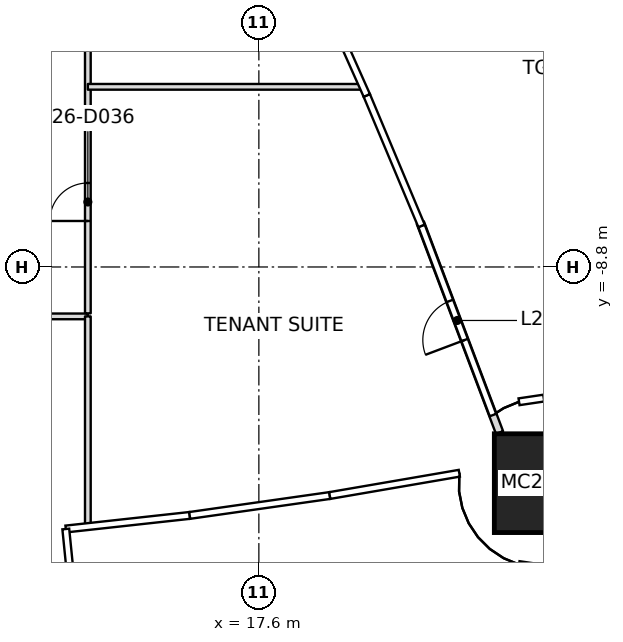
"""IFC4 building model, lengths in metres.
Left out: names, types, materials, properties, quantities, classifications, styles, units other than length and angle.
Written with IfcOpenShell. Run it as: python <this file> out.ifc"""

import sys

from ifc_helpers import new_model, si_unit, direction, frame, frame_2d, origin, origin_2d, place, context, subcontext, project, spatial, rectangle, extrude, clip, halfspace, element, fill, save


model = new_model("IFC4")
c1 = context("Model", 3, precision=1e-05, world=origin(), true_north=direction((0.0, 1.0)))
c2 = subcontext(c1, "Body", "Model", "MODEL_VIEW")
j1 = project(units=[si_unit("LENGTHUNIT", "METRE"), si_unit("PLANEANGLEUNIT", "RADIAN")], contexts=[c1])
p1 = place(None, origin())
s1 = spatial("IfcSite", under=j1, at=p1, CompositionType="ELEMENT")
p2 = place(p1, origin())
s2 = spatial("IfcBuilding", under=s1, at=p2, CompositionType="ELEMENT")
p3 = place(p2, frame((0.0, 0.0, 125.8)))
s3 = spatial("IfcBuildingStorey", under=s2, at=p3, CompositionType="ELEMENT", Elevation=125.8)
p4 = place(p3, frame((25.096, -14.489, 0.0), z_axis=(-0.028122372328, 0.016226791842, 0.999472772716), x_axis=(0.999604487872, 0.00045651644, 0.02811866672)))
e1 = element("IfcColumn", 1, at=p4, inside=s3, PredefinedType="COLUMN", context=c2, shape_type="SweptSolid", body=[
    clip(extrude(rectangle(XDim=2.6, YDim=2.6, at=origin_2d()), origin(), (0.0, 0.0, 1.0), 4.002), halfspace(frame((0.0, 0.0, 0.013)), True)),
])
p5 = place(p3, frame((23.933, -13.156, 0.0), z_axis=(0.0, 0.0, 1.0), x_axis=(-0.353112586712, 0.935580836222, 0.0)))
e2 = element("IfcWall", 2, at=p5, inside=s3, PredefinedType="SOLIDWALL", context=c2, shape_type="SweptSolid", body=[
    extrude(rectangle(XDim=5.902, YDim=0.2, at=frame_2d((2.951, 0.0))), origin(), (0.0, 0.0, 1.0), 3.34),
])
p6 = place(p5, frame((2.602, 0.0, 0.0)))
e3 = element("IfcOpeningElement", 3, at=p6, cuts=e2, PredefinedType="OPENING", context=c2, shape_type="SweptSolid", body=[
    extrude(rectangle(XDim=1.1, YDim=2.1, at=frame_2d((0.55, 1.05))), frame((0.0, 0.1, 0.0), z_axis=(0.0, -1.0, 0.0), x_axis=(1.0, 0.0, 0.0)), (0.0, 0.0, 1.0), 0.2),
])
p7 = place(p3, frame((13.1, -10.1, 0.0), z_axis=(0.0, 0.0, 1.0), x_axis=(0.0, -1.0, 0.0)))
e4 = element("IfcWall", 4, at=p7, inside=s3, PredefinedType="PARTITIONING", context=c2, shape_type="SweptSolid", body=[
    extrude(rectangle(XDim=5.545, YDim=0.15, at=frame_2d((2.772, 0.0))), origin(), (0.0, 0.0, 1.0), 3.45),
])
p8 = place(p3, frame((20.339, -4.059, 0.0), z_axis=(0.0, 0.0, 1.0), x_axis=(-1.0, 0.0, 0.0)))
e5 = element("IfcWall", 5, at=p8, inside=s3, PredefinedType="PARTITIONING", context=c2, shape_type="SweptSolid", body=[
    extrude(rectangle(XDim=7.239, YDim=0.15, at=frame_2d((3.619, 0.0))), origin(), (0.0, 0.0, 1.0), 3.247),
])
p9 = place(p3, frame((-13.02, -10.1, 0.0), z_axis=(0.0, 0.0, 1.0), x_axis=(1.0, 0.0, 0.0)))
e6 = element("IfcWall", 6, at=p9, inside=s3, PredefinedType="PARTITIONING", context=c2, shape_type="SweptSolid", body=[
    extrude(rectangle(XDim=26.12, YDim=0.15, at=frame_2d((13.06, 0.0))), origin(), (0.0, 0.0, 1.0), 3.317),
])
p10 = place(p9, frame((5.52, 0.0, 0.0)))
e7 = element("IfcOpeningElement", 7, at=p10, cuts=e6, PredefinedType="OPENING", context=c2, shape_type="SweptSolid", body=[
    extrude(rectangle(XDim=1.0, YDim=2.1, at=frame_2d((0.5, 1.05))), frame((0.0, 0.075, 0.0), z_axis=(0.0, -1.0, 0.0), x_axis=(1.0, 0.0, 0.0)), (0.0, 0.0, 1.0), 0.15),
])
p11 = place(p9, frame((18.62, 0.0, 0.0)))
e8 = element("IfcOpeningElement", 8, at=p11, cuts=e6, PredefinedType="OPENING", context=c2, shape_type="SweptSolid", body=[
    extrude(rectangle(XDim=1.0, YDim=2.1, at=frame_2d((0.5, 1.05))), frame((0.0, 0.075, 0.0), z_axis=(0.0, -1.0, 0.0), x_axis=(1.0, 0.0, 0.0)), (0.0, 0.0, 1.0), 0.15),
])
p12 = place(p3, frame((13.1, -10.02, 0.0), z_axis=(0.0, 0.0, 1.0), x_axis=(0.0, 1.0, 0.0)))
e9 = element("IfcWall", 9, at=p12, inside=s3, PredefinedType="PARTITIONING", context=c2, shape_type="SweptSolid", body=[
    extrude(rectangle(XDim=19.961, YDim=0.15, at=frame_2d((9.98, 0.0))), origin(), (0.0, 0.0, 1.0), 3.166),
])
p13 = place(p12, frame((12.461, 0.0, 0.0)))
e10 = element("IfcOpeningElement", 10, at=p13, cuts=e9, PredefinedType="OPENING", context=c2, shape_type="SweptSolid", body=[
    extrude(rectangle(XDim=1.0, YDim=2.1, at=frame_2d((0.5, 1.05))), frame((0.0, 0.075, 0.0), z_axis=(0.0, -1.0, 0.0), x_axis=(1.0, 0.0, 0.0)), (0.0, 0.0, 1.0), 0.15),
])
p14 = place(p12, frame((2.43, 0.0, 0.0)))
e11 = element("IfcOpeningElement", 11, at=p14, cuts=e9, PredefinedType="OPENING", context=c2, shape_type="SweptSolid", body=[
    extrude(rectangle(XDim=1.0, YDim=2.1, at=frame_2d((0.5, 1.05))), frame((0.0, 0.075, 0.0), z_axis=(0.0, -1.0, 0.0), x_axis=(1.0, 0.0, 0.0)), (0.0, 0.0, 1.0), 0.15),
])
p15 = place(p6, origin())
e12 = element("IfcDoor", 12, at=p15, inside=s3, OperationType="SINGLE_SWING_RIGHT", PredefinedType="DOOR", context=c2, shape_type="SweptSolid", body=[
    extrude(rectangle(XDim=1.1, YDim=2.1, at=frame_2d((0.55, 1.05))), frame((0.0, 0.025, 0.0), z_axis=(0.0, -1.0, 0.0), x_axis=(1.0, 0.0, 0.0)), (0.0, 0.0, 1.0), 0.05),
])
fill(e3, e12)
p16 = place(p14, origin())
e13 = element("IfcDoor", 13, at=p16, inside=s3, OperationType="SINGLE_SWING_LEFT", PredefinedType="DOOR", context=c2, shape_type="SweptSolid", body=[
    extrude(rectangle(XDim=1.0, YDim=2.1, at=frame_2d((0.5, 1.05))), frame((0.0, 0.025, 0.0), z_axis=(0.0, -1.0, 0.0), x_axis=(1.0, 0.0, 0.0)), (0.0, 0.0, 1.0), 0.05),
])
fill(e11, e13)
save(model, sys.argv[1])
